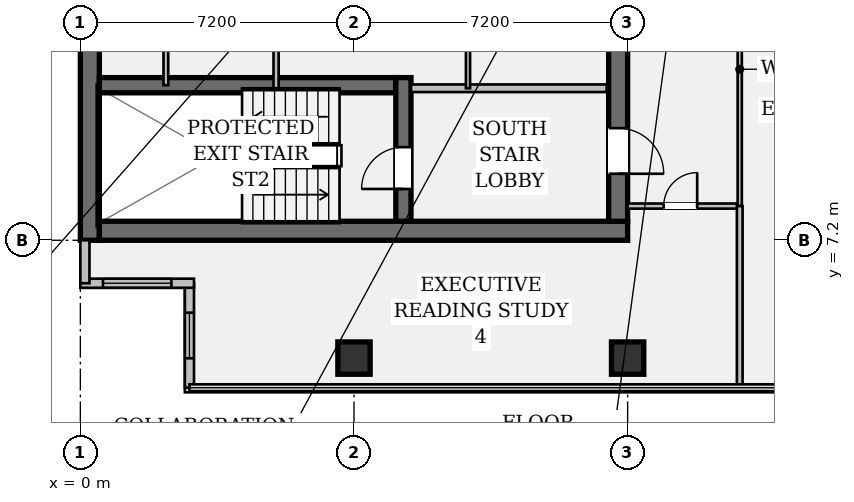
"""IFC4 building model, lengths in metres.
Left out: names, types, materials, properties, quantities, classifications, styles, units other than length and angle.
Written with IfcOpenShell. Run it as: python <this file> out.ifc"""

import sys

from ifc_helpers import new_model, si_unit, direction, frame, frame_2d, origin, origin_2d, place, context, subcontext, project, spatial, rectangle, hollow_rectangle, extrude, element, fill, save


model = new_model("IFC4")
c1 = context("Model", 3, precision=1e-05, world=origin(), true_north=direction((0.0, 1.0)))
c2 = subcontext(c1, "Body", "Model", "MODEL_VIEW")
j1 = project(units=[si_unit("LENGTHUNIT", "METRE"), si_unit("PLANEANGLEUNIT", "RADIAN")], contexts=[c1])
p1 = place(None, origin())
s1 = spatial("IfcSite", under=j1, at=p1, CompositionType="ELEMENT")
p2 = place(p1, origin())
s2 = spatial("IfcBuilding", under=s1, at=p2, CompositionType="ELEMENT")
p3 = place(p2, frame((0.0, 0.0, 183.75)))
s3 = spatial("IfcBuildingStorey", under=s2, at=p3, CompositionType="ELEMENT", Elevation=183.75)
p4 = place(p3, frame((0.25, 7.2, 0.0), z_axis=(0.0, 0.0, 1.0), x_axis=(0.0, 1.0, 0.0)))
e1 = element("IfcWall", 1, at=p4, inside=s3, PredefinedType="SHEAR", context=c2, shape_type="SweptSolid", body=[
    extrude(rectangle(XDim=28.8, YDim=0.5, at=frame_2d((14.4, 0.0))), origin(), (0.0, 0.0, 1.0), 3.24),
])
p5 = place(p3, frame((0.5, 7.45, 0.0), z_axis=(0.0, 0.0, 1.0), x_axis=(1.0, 0.0, 0.0)))
e2 = element("IfcWall", 2, at=p5, inside=s3, PredefinedType="SHEAR", context=c2, shape_type="SweptSolid", body=[
    extrude(rectangle(XDim=13.9, YDim=0.5, at=frame_2d((6.95, 0.0))), origin(), (0.0, 0.0, 1.0), 3.24),
])
p6 = place(p3, frame((14.15, 35.5, 0.0), z_axis=(0.0, 0.0, 1.0), x_axis=(0.0, -1.0, 0.0)))
e3 = element("IfcWall", 3, at=p6, inside=s3, PredefinedType="SHEAR", context=c2, shape_type="SweptSolid", body=[
    extrude(rectangle(XDim=27.8, YDim=0.5, at=frame_2d((13.9, 0.0))), origin(), (0.0, 0.0, 1.0), 3.24),
])
p7 = place(p6, frame((1.4, 0.0, 0.0)))
e4 = element("IfcOpeningElement", 4, at=p7, cuts=e3, PredefinedType="OPENING", context=c2, shape_type="SweptSolid", body=[
    extrude(rectangle(XDim=1.2, YDim=2.15, at=frame_2d((0.6, 1.075))), frame((0.0, 0.262, 0.0), z_axis=(0.0, -1.0, 0.0), x_axis=(1.0, 0.0, 0.0)), (0.0, 0.0, 1.0), 0.524),
])
p8 = place(p6, frame((25.35, 0.0, 0.0)))
e5 = element("IfcOpeningElement", 5, at=p8, cuts=e3, PredefinedType="OPENING", context=c2, shape_type="SweptSolid", body=[
    extrude(rectangle(XDim=1.2, YDim=2.15, at=frame_2d((0.6, 1.075))), frame((0.0, 0.262, 0.0), z_axis=(0.0, -1.0, 0.0), x_axis=(1.0, 0.0, 0.0)), (0.0, 0.0, 1.0), 0.524),
])
p9 = place(p6, frame((14.7, 0.0, 0.0)))
e6 = element("IfcOpeningElement", 6, at=p9, cuts=e3, PredefinedType="OPENING", context=c2, shape_type="SweptSolid", body=[
    extrude(rectangle(XDim=1.6, YDim=2.2, at=frame_2d((0.8, 1.1))), frame((0.0, 0.262, 0.0), z_axis=(0.0, -1.0, 0.0), x_axis=(1.0, 0.0, 0.0)), (0.0, 0.0, 1.0), 0.524),
])
p10 = place(p3, frame((0.5, 11.28, 0.0), z_axis=(0.0, 0.0, 1.0), x_axis=(1.0, 0.0, 0.0)))
e7 = element("IfcWall", 7, at=p10, inside=s3, PredefinedType="SHEAR", context=c2, shape_type="SweptSolid", body=[
    extrude(rectangle(XDim=7.8, YDim=0.4, at=frame_2d((3.9, 0.0))), origin(), (0.0, 0.0, 1.0), 3.24),
])
p11 = place(p3, frame((8.5, 7.7, 0.0), z_axis=(0.0, 0.0, 1.0), x_axis=(0.0, 1.0, 0.0)))
e8 = element("IfcWall", 8, at=p11, inside=s3, PredefinedType="SHEAR", context=c2, shape_type="SweptSolid", body=[
    extrude(rectangle(XDim=3.78, YDim=0.4, at=frame_2d((1.89, 0.0))), origin(), (0.0, 0.0, 1.0), 3.24),
])
p12 = place(p11, frame((0.85, 0.0, 0.0)))
e9 = element("IfcOpeningElement", 9, at=p12, cuts=e8, PredefinedType="OPENING", context=c2, shape_type="SweptSolid", body=[
    extrude(rectangle(XDim=1.1, YDim=2.15, at=frame_2d((0.55, 1.075))), frame((0.0, 0.212, 0.0), z_axis=(0.0, -1.0, 0.0), x_axis=(1.0, 0.0, 0.0)), (0.0, 0.0, 1.0), 0.424),
])
for number, where, z_axis, x_axis in (
    (10, (7.2, 4.1, 0.0), (0.0, 0.0, 1.0), (1.0, 0.0, 0.0)),
    (11, (14.4, 4.1, 0.0), (0.0, 0.0, 1.0), (1.0, 0.0, 0.0)),
):
    element("IfcColumn", number, at=place(p3, frame(where, z_axis=z_axis, x_axis=x_axis)), inside=s3, PredefinedType="COLUMN", context=c2, shape_type="SweptSolid", body=[
        extrude(hollow_rectangle(XDim=0.85, YDim=0.85, WallThickness=0.05, at=origin_2d()), origin(), (0.0, 0.0, 1.0), 3.24),
    ])
p13 = place(p3, frame((2.87, 3.32, 0.0), z_axis=(0.0, 0.0, 1.0), x_axis=(0.0, 1.0, 0.0)))
e12 = element("IfcWall", 12, at=p13, inside=s3, PredefinedType="STANDARD", context=c2, shape_type="SweptSolid", body=[
    extrude(rectangle(XDim=2.75, YDim=0.24, at=frame_2d((1.375, 0.0))), origin(), (0.0, 0.0, 1.0), 3.24),
])
p14 = place(p13, frame((0.775, 0.0, 0.95)))
e13 = element("IfcOpeningElement", 13, at=p14, cuts=e12, PredefinedType="OPENING", context=c2, shape_type="SweptSolid", body=[
    extrude(rectangle(XDim=1.2, YDim=1.8, at=frame_2d((0.6, 0.9))), frame((0.0, 0.132, 0.0), z_axis=(0.0, -1.0, 0.0), x_axis=(1.0, 0.0, 0.0)), (0.0, 0.0, 1.0), 0.264),
])
p15 = place(p3, frame((2.99, 6.07, 0.0), z_axis=(0.0, 0.0, 1.0), x_axis=(-1.0, 0.0, 0.0)))
e14 = element("IfcWall", 14, at=p15, inside=s3, PredefinedType="STANDARD", context=c2, shape_type="SweptSolid", body=[
    extrude(rectangle(XDim=2.99, YDim=0.24, at=frame_2d((1.495, 0.0))), origin(), (0.0, 0.0, 1.0), 3.24),
])
p16 = place(p15, frame((0.595, 0.0, 0.95)))
e15 = element("IfcOpeningElement", 15, at=p16, cuts=e14, PredefinedType="OPENING", context=c2, shape_type="SweptSolid", body=[
    extrude(rectangle(XDim=1.8, YDim=1.35, at=frame_2d((0.9, 0.675))), frame((0.0, 0.132, 0.0), z_axis=(0.0, -1.0, 0.0), x_axis=(1.0, 0.0, 0.0)), (0.0, 0.0, 1.0), 0.264),
])
p17 = place(p3, frame((0.12, 6.07, 0.0), z_axis=(0.0, 0.0, 1.0), x_axis=(0.0, 1.0, 0.0)))
e16 = element("IfcWall", 16, at=p17, inside=s3, PredefinedType="STANDARD", context=c2, shape_type="SweptSolid", body=[
    extrude(rectangle(XDim=1.13, YDim=0.24, at=frame_2d((0.565, 0.0))), origin(), (0.0, 0.0, 1.0), 3.24),
])
p18 = place(p3, frame((8.7, 11.2, 0.0), z_axis=(0.0, 0.0, 1.0), x_axis=(1.0, 0.0, 0.0)))
e17 = element("IfcWall", 17, at=p18, inside=s3, PredefinedType="PARTITIONING", context=c2, shape_type="SweptSolid", body=[
    extrude(rectangle(XDim=5.15, YDim=0.2, at=frame_2d((2.575, 0.0))), origin(), (0.0, 0.0, 1.0), 3.24),
])
p19 = place(p3, frame((5.15, 11.2, 0.0), z_axis=(0.0, 0.0, 1.0), x_axis=(0.0, 1.0, 0.0)))
e18 = element("IfcWall", 18, at=p19, inside=s3, PredefinedType="PARTITIONING", context=c2, shape_type="SweptSolid", body=[
    extrude(rectangle(XDim=6.6, YDim=0.135, at=frame_2d((3.3, 0.0))), origin(), (0.0, 0.0, 1.0), 3.24),
])
p20 = place(p3, frame((10.2, 11.2, 0.0), z_axis=(0.0, 0.0, 1.0), x_axis=(0.0, 1.0, 0.0)))
e19 = element("IfcWall", 19, at=p20, inside=s3, PredefinedType="PARTITIONING", context=c2, shape_type="SweptSolid", body=[
    extrude(rectangle(XDim=6.6, YDim=0.11, at=frame_2d((3.3, 0.0))), origin(), (0.0, 0.0, 1.0), 3.24),
])
p21 = place(p3, frame((2.25, 11.28, 0.0), z_axis=(0.0, 0.0, 1.0), x_axis=(0.0, 1.0, 0.0)))
e20 = element("IfcWall", 20, at=p21, inside=s3, PredefinedType="PARTITIONING", context=c2, shape_type="SweptSolid", body=[
    extrude(rectangle(XDim=4.42, YDim=0.125, at=frame_2d((2.21, 0.0))), origin(), (0.0, 0.0, 1.0), 3.24),
])
p22 = place(p21, frame((1.65, 0.0, 0.0)))
e21 = element("IfcOpeningElement", 21, at=p22, cuts=e20, PredefinedType="OPENING", context=c2, shape_type="SweptSolid", body=[
    extrude(rectangle(XDim=0.85, YDim=2.15, at=frame_2d((0.425, 1.075))), frame((0.0, 0.074, 0.0), z_axis=(0.0, -1.0, 0.0), x_axis=(1.0, 0.0, 0.0)), (0.0, 0.0, 1.0), 0.149),
])
p23 = place(p3, frame((14.4, 8.1, 0.0), z_axis=(0.0, 0.0, 1.0), x_axis=(1.0, 0.0, 0.0)))
e22 = element("IfcWall", 22, at=p23, inside=s3, PredefinedType="PARTITIONING", context=c2, shape_type="SweptSolid", body=[
    extrude(rectangle(XDim=2.95, YDim=0.135, at=frame_2d((1.475, 0.0))), origin(), (0.0, 0.0, 1.0), 2.808),
])
p24 = place(p23, frame((0.95, 0.0, 0.0)))
e23 = element("IfcOpeningElement", 23, at=p24, cuts=e22, PredefinedType="OPENING", context=c2, shape_type="SweptSolid", body=[
    extrude(rectangle(XDim=0.88, YDim=2.15, at=frame_2d((0.44, 1.075))), frame((0.0, 0.08, 0.0), z_axis=(0.0, -1.0, 0.0), x_axis=(1.0, 0.0, 0.0)), (0.0, 0.0, 1.0), 0.159),
])
p25 = place(p3, frame((17.35, 8.1, 0.0), z_axis=(0.0, 0.0, 1.0), x_axis=(0.0, 1.0, 0.0)))
e24 = element("IfcWall", 24, at=p25, inside=s3, PredefinedType="PARTITIONING", context=c2, shape_type="SweptSolid", body=[
    extrude(rectangle(XDim=7.2, YDim=0.11, at=frame_2d((3.6, 0.0))), origin(), (0.0, 0.0, 1.0), 2.603),
])
p26 = place(p3, frame((17.35, 3.32, 0.0), z_axis=(0.0, 0.0, 1.0), x_axis=(0.0, 1.0, 0.0)))
e25 = element("IfcWall", 25, at=p26, inside=s3, PredefinedType="PARTITIONING", context=c2, shape_type="SweptSolid", body=[
    extrude(rectangle(XDim=4.78, YDim=0.15, at=frame_2d((2.39, 0.0))), origin(), (0.0, 0.0, 1.0), 2.603),
])
p27 = place(p14, origin())
e26 = element("IfcWindow", 26, at=p27, inside=s3, PartitioningType="SINGLE_PANEL", PredefinedType="WINDOW", context=c2, shape_type="SweptSolid", body=[
    extrude(rectangle(XDim=1.2, YDim=1.8, at=frame_2d((0.6, 0.9))), frame((0.0, 0.03, 0.0), z_axis=(0.0, -1.0, 0.0), x_axis=(1.0, 0.0, 0.0)), (0.0, 0.0, 1.0), 0.06),
])
fill(e13, e26)
p28 = place(p16, origin())
e27 = element("IfcWindow", 27, at=p28, inside=s3, PartitioningType="SINGLE_PANEL", PredefinedType="WINDOW", context=c2, shape_type="SweptSolid", body=[
    extrude(rectangle(XDim=1.8, YDim=1.35, at=frame_2d((0.9, 0.675))), frame((0.0, 0.03, 0.0), z_axis=(0.0, -1.0, 0.0), x_axis=(1.0, 0.0, 0.0)), (0.0, 0.0, 1.0), 0.06),
])
fill(e15, e27)
p29 = place(p12, origin())
e28 = element("IfcDoor", 28, at=p29, inside=s3, OperationType="SINGLE_SWING_LEFT", PredefinedType="DOOR", context=c2, shape_type="SweptSolid", body=[
    extrude(rectangle(XDim=1.1, YDim=2.15, at=frame_2d((0.55, 1.075))), frame((0.0, 0.025, 0.0), z_axis=(0.0, -1.0, 0.0), x_axis=(1.0, 0.0, 0.0)), (0.0, 0.0, 1.0), 0.05),
])
fill(e9, e28)
p30 = place(p8, origin())
e29 = element("IfcDoor", 29, at=p30, inside=s3, OperationType="SINGLE_SWING_RIGHT", PredefinedType="DOOR", context=c2, shape_type="SweptSolid", body=[
    extrude(rectangle(XDim=1.2, YDim=2.15, at=frame_2d((0.6, 1.075))), frame((0.0, 0.025, 0.0), z_axis=(0.0, -1.0, 0.0), x_axis=(1.0, 0.0, 0.0)), (0.0, 0.0, 1.0), 0.05),
])
fill(e5, e29)
p31 = place(p24, origin())
e30 = element("IfcDoor", 30, at=p31, inside=s3, OperationType="SINGLE_SWING_RIGHT", PredefinedType="DOOR", context=c2, shape_type="SweptSolid", body=[
    extrude(rectangle(XDim=0.88, YDim=2.15, at=frame_2d((0.44, 1.075))), frame((0.0, 0.025, 0.0), z_axis=(0.0, -1.0, 0.0), x_axis=(1.0, 0.0, 0.0)), (0.0, 0.0, 1.0), 0.05),
])
fill(e23, e30)
save(model, sys.argv[1])
